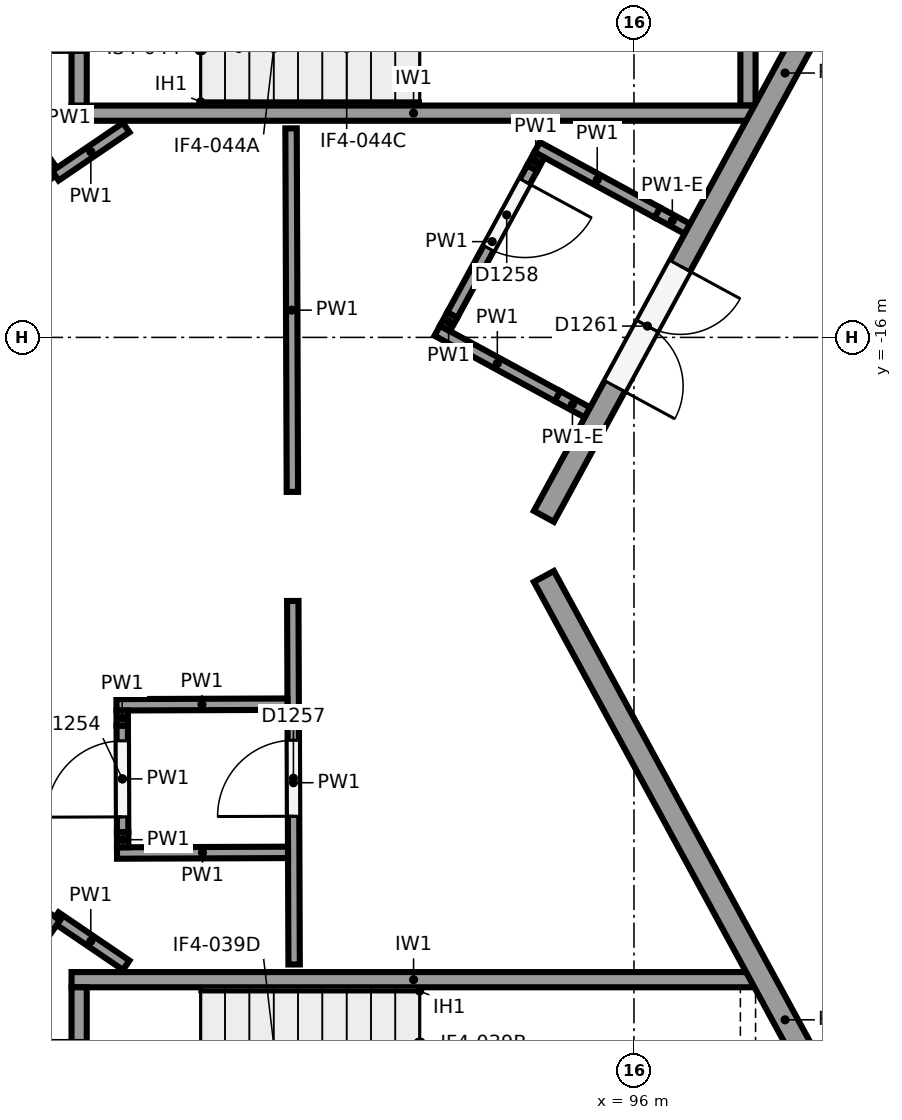
"""IFC4 building model, lengths in metres.
Left out: names, types, materials, properties, quantities, classifications, styles, units other than length and angle.
Written with IfcOpenShell. Run it as: python <this file> out.ifc"""

import sys

from ifc_helpers import new_model, si_unit, direction, frame, frame_2d, origin, origin_2d, place, context, subcontext, project, spatial, rectangle, circle, extrude, element, fill, save


model = new_model("IFC4")
c1 = context("Model", 3, precision=1e-05, world=origin(), true_north=direction((0.0, 1.0)))
c2 = subcontext(c1, "Body", "Model", "MODEL_VIEW")
j1 = project(units=[si_unit("LENGTHUNIT", "METRE"), si_unit("PLANEANGLEUNIT", "RADIAN")], contexts=[c1])
p1 = place(None, origin())
s1 = spatial("IfcSite", under=j1, at=p1, CompositionType="ELEMENT")
p2 = place(p1, origin())
s2 = spatial("IfcBuilding", under=s1, at=p2, CompositionType="ELEMENT")
p3 = place(p2, frame((0.0, 0.0, 12.0)))
s3 = spatial("IfcBuildingStorey", under=s2, at=p3, CompositionType="ELEMENT", Elevation=12.0)
p4 = place(p3, frame((94.6, -18.75, 0.0), z_axis=(0.0, 0.0, 1.0), x_axis=(1.0, 0.0, 0.0)))
e1 = element("IfcColumn", 1, at=p4, inside=s3, PredefinedType="COLUMN", context=c2, shape_type="SweptSolid", body=[
    extrude(circle(Radius=0.45, at=origin_2d()), origin(), (0.0, 0.0, 1.0), 6.0),
])
p5 = place(p3, frame((98.6, -18.75, 0.0), z_axis=(0.0, 0.0, 1.0), x_axis=(1.0, 0.0, 0.0)))
e2 = element("IfcColumn", 2, at=p5, inside=s3, PredefinedType="COLUMN", context=c2, shape_type="SweptSolid", body=[
    extrude(circle(Radius=0.4, at=origin_2d()), origin(), (0.0, 0.0, 1.0), 6.0),
])
p6 = place(p3, frame((94.815, -19.145, 0.0), z_axis=(0.0, 0.0, 1.0), x_axis=(0.477867771117, -0.878431780691, 0.0)))
e3 = element("IfcWall", 3, at=p6, inside=s3, PredefinedType="SOLIDWALL", context=c2, shape_type="SweptSolid", body=[
    extrude(rectangle(XDim=13.28, YDim=0.3, at=frame_2d((6.64, 0.0))), origin(), (0.0, 0.0, 1.0), 4.35),
])
p7 = place(p3, frame((101.161, -6.689, 0.0), z_axis=(0.0, 0.0, 1.0), x_axis=(-0.477867771117, -0.878431780691, 0.0)))
e4 = element("IfcWall", 4, at=p7, inside=s3, PredefinedType="SOLIDWALL", context=c2, shape_type="SweptSolid", body=[
    extrude(rectangle(XDim=13.28, YDim=0.3, at=frame_2d((6.64, 0.0))), origin(), (0.0, 0.0, 1.0), 4.35),
])
p8 = place(p7, frame((9.53, 0.0, 0.0)))
e5 = element("IfcOpeningElement", 5, at=p8, cuts=e4, PredefinedType="OPENING", context=c2, shape_type="SweptSolid", body=[
    extrude(rectangle(XDim=1.8, YDim=2.4, at=frame_2d((0.9, 1.2))), frame((0.0, 0.16, 0.0), z_axis=(0.0, -1.0, 0.0), x_axis=(1.0, 0.0, 0.0)), (0.0, 0.0, 1.0), 0.32),
])
p9 = place(p3, frame((97.6, -24.45, 0.0), z_axis=(0.0, 0.0, 1.0), x_axis=(-1.0, 0.0, 0.0)))
e6 = element("IfcWall", 6, at=p9, inside=s3, PredefinedType="SHEAR", context=c2, shape_type="SweptSolid", body=[
    extrude(rectangle(XDim=9.0, YDim=0.2, at=frame_2d((4.5, 0.0))), origin(), (0.0, 0.0, 1.0), 5.65),
])
p10 = place(p3, frame((97.5, -31.15, 0.0), z_axis=(0.0, 0.0, 1.0), x_axis=(0.0, 1.0, 0.0)))
e7 = element("IfcWall", 7, at=p10, inside=s3, PredefinedType="SHEAR", context=c2, shape_type="SweptSolid", body=[
    extrude(rectangle(XDim=6.6, YDim=0.2, at=frame_2d((3.3, 0.0))), origin(), (0.0, 0.0, 1.0), 5.65),
])
p11 = place(p3, frame((88.7, -27.75, 0.0), z_axis=(0.0, 0.0, 1.0), x_axis=(0.0, 1.0, 0.0)))
e8 = element("IfcWall", 8, at=p11, inside=s3, PredefinedType="SHEAR", context=c2, shape_type="SweptSolid", body=[
    extrude(rectangle(XDim=3.2, YDim=0.2, at=frame_2d((1.6, 0.0))), origin(), (0.0, 0.0, 1.0), 5.65),
])
p12 = place(p11, frame((0.7, 0.0, 0.0)))
e9 = element("IfcOpeningElement", 9, at=p12, cuts=e8, PredefinedType="OPENING", context=c2, shape_type="SweptSolid", body=[
    extrude(rectangle(XDim=1.8, YDim=2.1, at=frame_2d((0.9, 1.05))), frame((0.0, 0.11, 0.0), z_axis=(0.0, -1.0, 0.0), x_axis=(1.0, 0.0, 0.0)), (0.0, 0.0, 1.0), 0.22),
])
p13 = place(p3, frame((97.6, -13.05, 0.0), z_axis=(0.0, 0.0, 1.0), x_axis=(-1.0, 0.0, 0.0)))
e10 = element("IfcWall", 10, at=p13, inside=s3, PredefinedType="SHEAR", context=c2, shape_type="SweptSolid", body=[
    extrude(rectangle(XDim=9.0, YDim=0.2, at=frame_2d((4.5, 0.0))), origin(), (0.0, 0.0, 1.0), 5.65),
])
p14 = place(p3, frame((97.5, -12.95, 0.0), z_axis=(0.0, 0.0, 1.0), x_axis=(0.0, 1.0, 0.0)))
e11 = element("IfcWall", 11, at=p14, inside=s3, PredefinedType="SHEAR", context=c2, shape_type="SweptSolid", body=[
    extrude(rectangle(XDim=6.6, YDim=0.2, at=frame_2d((3.3, 0.0))), origin(), (0.0, 0.0, 1.0), 5.65),
])
p15 = place(p3, frame((88.7, -12.95, 0.0), z_axis=(0.0, 0.0, 1.0), x_axis=(0.0, 1.0, 0.0)))
e12 = element("IfcWall", 12, at=p15, inside=s3, PredefinedType="SHEAR", context=c2, shape_type="SweptSolid", body=[
    extrude(rectangle(XDim=3.2, YDim=0.2, at=frame_2d((1.6, 0.0))), origin(), (0.0, 0.0, 1.0), 5.65),
])
p16 = place(p15, frame((0.7, 0.0, 0.0)))
e13 = element("IfcOpeningElement", 13, at=p16, cuts=e12, PredefinedType="OPENING", context=c2, shape_type="SweptSolid", body=[
    extrude(rectangle(XDim=1.8, YDim=2.1, at=frame_2d((0.9, 1.05))), frame((0.0, 0.11, 0.0), z_axis=(0.0, -1.0, 0.0), x_axis=(1.0, 0.0, 0.0)), (0.0, 0.0, 1.0), 0.22),
])
p17 = place(p3, frame((91.529, -24.25, 0.0), z_axis=(0.0, 0.0, 1.0), x_axis=(-0.00367531974, 0.99999324599, 0.0)))
e14 = element("IfcWall", 14, at=p17, inside=s3, PredefinedType="PARTITIONING", context=c2, shape_type="SweptSolid", body=[
    extrude(rectangle(XDim=4.783, YDim=0.15, at=frame_2d((2.391, 0.0))), origin(), (0.0, 0.0, 1.0), 5.65),
])
p18 = place(p17, frame((1.95, 0.0, 0.0)))
e15 = element("IfcOpeningElement", 15, at=p18, cuts=e14, PredefinedType="OPENING", context=c2, shape_type="SweptSolid", body=[
    extrude(rectangle(XDim=1.0, YDim=2.1, at=frame_2d((0.5, 1.05))), frame((0.0, 0.085, 0.0), z_axis=(0.0, -1.0, 0.0), x_axis=(1.0, 0.0, 0.0)), (0.0, 0.0, 1.0), 0.17),
])
p19 = place(p3, frame((91.506, -18.033, 0.0), z_axis=(0.0, 0.0, 1.0), x_axis=(-0.003624274308, 0.999993432296, 0.0)))
e16 = element("IfcWall", 16, at=p19, inside=s3, PredefinedType="PARTITIONING", context=c2, shape_type="SweptSolid", body=[
    extrude(rectangle(XDim=4.783, YDim=0.15, at=frame_2d((2.391, 0.0))), origin(), (0.0, 0.0, 1.0), 5.65),
])
p20 = place(p3, frame((89.32, -24.26, 0.0), z_axis=(0.0, 0.0, 1.0), x_axis=(-0.827055308354, 0.562120553728, 0.0)))
e17 = element("IfcWall", 17, at=p20, inside=s3, PredefinedType="PARTITIONING", context=c2, shape_type="SweptSolid", body=[
    extrude(rectangle(XDim=1.128, YDim=0.15, at=frame_2d((0.564, 0.0))), origin(), (0.0, 0.0, 1.0), 5.65),
])
p21 = place(p3, frame((88.387, -23.626, 0.0), z_axis=(0.0, 0.0, 1.0), x_axis=(-0.575376756214, -0.817888493872, 0.0)))
e18 = element("IfcWall", 18, at=p21, inside=s3, PredefinedType="PARTITIONING", context=c2, shape_type="SweptSolid", body=[
    extrude(rectangle(XDim=0.83, YDim=0.15, at=frame_2d((0.415, 0.0))), origin(), (0.0, 0.0, 1.0), 5.65),
])
p22 = place(p3, frame((87.909, -13.195, 0.0), z_axis=(0.0, 0.0, 1.0), x_axis=(0.576359888906, -0.817195985342, 0.0)))
e19 = element("IfcWall", 19, at=p22, inside=s3, PredefinedType="PARTITIONING", context=c2, shape_type="SweptSolid", body=[
    extrude(rectangle(XDim=0.83, YDim=0.15, at=frame_2d((0.415, 0.0))), origin(), (0.0, 0.0, 1.0), 5.65),
])
p23 = place(p3, frame((88.388, -13.874, 0.0), z_axis=(0.0, 0.0, 1.0), x_axis=(0.826749248939, 0.562570599462, 0.0)))
e20 = element("IfcWall", 20, at=p23, inside=s3, PredefinedType="PARTITIONING", context=c2, shape_type="SweptSolid", body=[
    extrude(rectangle(XDim=1.127, YDim=0.15, at=frame_2d((0.564, 0.0))), origin(), (0.0, 0.0, 1.0), 5.65),
])
for number, where, z_axis, x_axis in (
    (21, (91.448, -22.775, 0.0), (0.0, 0.0, 1.0), (-1.0, -0.004, 0.0)),
    (22, (91.441, -20.825, 0.0), (0.0, 0.0, 1.0), (-1.0, -0.004, 0.0)),
):
    element("IfcWall", number, at=place(p3, frame(where, z_axis=z_axis, x_axis=x_axis)), inside=s3, PredefinedType="PARTITIONING", context=c2, shape_type="SweptSolid", body=[
        extrude(rectangle(XDim=2.25, YDim=0.15, at=frame_2d((1.125, 0.0))), origin(), (0.0, 0.0, 1.0), 5.65),
    ])
p24 = place(p3, frame((89.273, -22.708, 0.0), z_axis=(0.0, 0.0, 1.0), x_axis=(-0.003662979089, 0.99999329127, 0.0)))
e23 = element("IfcWall", 23, at=p24, inside=s3, PredefinedType="PARTITIONING", context=c2, shape_type="SweptSolid", body=[
    extrude(rectangle(XDim=0.2, YDim=0.15, at=frame_2d((0.1, 0.0))), origin(), (0.0, 0.0, 1.0), 5.65),
])
p25 = place(p3, frame((89.272, -22.508, 0.0), z_axis=(0.0, 0.0, 1.0), x_axis=(-0.00366234028, 0.999993293609, 0.0)))
e24 = element("IfcWall", 24, at=p25, inside=s3, PredefinedType="PARTITIONING", context=c2, shape_type="SweptSolid", body=[
    extrude(rectangle(XDim=1.4, YDim=0.15, at=frame_2d((0.7, 0.0))), origin(), (0.0, 0.0, 1.0), 5.65),
])
p26 = place(p25, frame((0.2, 0.0, 0.0)))
e25 = element("IfcOpeningElement", 25, at=p26, cuts=e24, PredefinedType="OPENING", context=c2, shape_type="SweptSolid", body=[
    extrude(rectangle(XDim=1.0, YDim=2.1, at=frame_2d((0.5, 1.05))), frame((0.0, 0.085, 0.0), z_axis=(0.0, -1.0, 0.0), x_axis=(1.0, 0.0, 0.0)), (0.0, 0.0, 1.0), 0.17),
])
p27 = place(p3, frame((89.267, -21.108, 0.0), z_axis=(0.0, 0.0, 1.0), x_axis=(-0.003658512101, 0.999993307622, 0.0)))
e26 = element("IfcWall", 26, at=p27, inside=s3, PredefinedType="PARTITIONING", context=c2, shape_type="SweptSolid", body=[
    extrude(rectangle(XDim=0.2, YDim=0.15, at=frame_2d((0.1, 0.0))), origin(), (0.0, 0.0, 1.0), 5.65),
])
p28 = place(p3, frame((96.702, -14.572, 0.0), z_axis=(0.0, 0.0, 1.0), x_axis=(-0.878372019733, 0.477977609256, 0.0)))
e27 = element("IfcWall", 27, at=p28, inside=s3, PredefinedType="PARTITIONING", context=c2, shape_type="SweptSolid", body=[
    extrude(rectangle(XDim=0.45, YDim=0.15, at=frame_2d((0.225, 0.0))), origin(), (0.0, 0.0, 1.0), 4.35),
])
p29 = place(p3, frame((96.307, -14.357, 0.0), z_axis=(0.0, 0.0, 1.0), x_axis=(-0.878428962466, 0.477872951632, 0.0)))
e28 = element("IfcWall", 28, at=p29, inside=s3, PredefinedType="PARTITIONING", context=c2, shape_type="SweptSolid", body=[
    extrude(rectangle(XDim=1.8, YDim=0.15, at=frame_2d((0.9, 0.0))), origin(), (0.0, 0.0, 1.0), 5.65),
])
p30 = place(p3, frame((95.388, -16.987, 0.0), z_axis=(0.0, 0.0, 1.0), x_axis=(-0.878372019733, 0.477977609256, 0.0)))
e29 = element("IfcWall", 29, at=p30, inside=s3, PredefinedType="PARTITIONING", context=c2, shape_type="SweptSolid", body=[
    extrude(rectangle(XDim=0.45, YDim=0.15, at=frame_2d((0.225, 0.0))), origin(), (0.0, 0.0, 1.0), 4.35),
])
p31 = place(p3, frame((94.993, -16.772, 0.0), z_axis=(0.0, 0.0, 1.0), x_axis=(-0.878459932885, 0.477816017223, 0.0)))
e30 = element("IfcWall", 30, at=p31, inside=s3, PredefinedType="PARTITIONING", context=c2, shape_type="SweptSolid", body=[
    extrude(rectangle(XDim=1.8, YDim=0.15, at=frame_2d((0.9, 0.0))), origin(), (0.0, 0.0, 1.0), 5.65),
])
p32 = place(p3, frame((94.756, -13.598, 0.0), z_axis=(0.0, 0.0, 1.0), x_axis=(-0.478168266369, -0.878268244352, 0.0)))
e31 = element("IfcWall", 31, at=p32, inside=s3, PredefinedType="PARTITIONING", context=c2, shape_type="SweptSolid", body=[
    extrude(rectangle(XDim=0.2, YDim=0.15, at=frame_2d((0.1, 0.0))), origin(), (0.0, 0.0, 1.0), 5.65),
])
p33 = place(p3, frame((94.66, -13.774, 0.0), z_axis=(0.0, 0.0, 1.0), x_axis=(-0.477887643273, -0.878420969927, 0.0)))
e32 = element("IfcWall", 32, at=p33, inside=s3, PredefinedType="PARTITIONING", context=c2, shape_type="SweptSolid", body=[
    extrude(rectangle(XDim=2.2, YDim=0.15, at=frame_2d((1.1, 0.0))), origin(), (0.0, 0.0, 1.0), 5.65),
])
p34 = place(p33, frame((0.2, 0.0, 0.0)))
e33 = element("IfcOpeningElement", 33, at=p34, cuts=e32, PredefinedType="OPENING", context=c2, shape_type="SweptSolid", body=[
    extrude(rectangle(XDim=1.0, YDim=2.1, at=frame_2d((0.5, 1.05))), frame((0.0, 0.085, 0.0), z_axis=(0.0, -1.0, 0.0), x_axis=(1.0, 0.0, 0.0)), (0.0, 0.0, 1.0), 0.17),
])
p35 = place(p3, frame((93.609, -15.706, 0.0), z_axis=(0.0, 0.0, 1.0), x_axis=(-0.477226530971, -0.878780312785, 0.0)))
e34 = element("IfcWall", 34, at=p35, inside=s3, PredefinedType="PARTITIONING", context=c2, shape_type="SweptSolid", body=[
    extrude(rectangle(XDim=0.2, YDim=0.15, at=frame_2d((0.1, 0.0))), origin(), (0.0, 0.0, 1.0), 5.65),
])
p36 = place(p8, origin())
e35 = element("IfcDoor", 35, at=p36, inside=s3, OperationType="DOUBLE_DOOR_SINGLE_SWING", PredefinedType="DOOR", context=c2, shape_type="SweptSolid", body=[
    extrude(rectangle(XDim=1.8, YDim=2.4, at=frame_2d((0.9, 1.2))), frame((0.0, 0.025, 0.0), z_axis=(0.0, -1.0, 0.0), x_axis=(1.0, 0.0, 0.0)), (0.0, 0.0, 1.0), 0.05),
])
fill(e5, e35)
p37 = place(p16, origin())
e36 = element("IfcDoor", 36, at=p37, inside=s3, OperationType="DOUBLE_DOOR_SINGLE_SWING", PredefinedType="DOOR", context=c2, shape_type="SweptSolid", body=[
    extrude(rectangle(XDim=1.8, YDim=2.1, at=frame_2d((0.9, 1.05))), frame((0.0, 0.025, 0.0), z_axis=(0.0, -1.0, 0.0), x_axis=(1.0, 0.0, 0.0)), (0.0, 0.0, 1.0), 0.05),
])
fill(e13, e36)
p38 = place(p18, origin())
e37 = element("IfcDoor", 37, at=p38, inside=s3, OperationType="SINGLE_SWING_LEFT", PredefinedType="DOOR", context=c2, shape_type="SweptSolid", body=[
    extrude(rectangle(XDim=1.0, YDim=2.1, at=frame_2d((0.5, 1.05))), frame((0.0, 0.025, 0.0), z_axis=(0.0, -1.0, 0.0), x_axis=(1.0, 0.0, 0.0)), (0.0, 0.0, 1.0), 0.05),
])
fill(e15, e37)
p39 = place(p26, origin())
e38 = element("IfcDoor", 38, at=p39, inside=s3, OperationType="SINGLE_SWING_LEFT", PredefinedType="DOOR", context=c2, shape_type="SweptSolid", body=[
    extrude(rectangle(XDim=1.0, YDim=2.1, at=frame_2d((0.5, 1.05))), frame((0.0, 0.025, 0.0), z_axis=(0.0, -1.0, 0.0), x_axis=(1.0, 0.0, 0.0)), (0.0, 0.0, 1.0), 0.05),
])
fill(e25, e38)
p40 = place(p34, origin())
e39 = element("IfcDoor", 39, at=p40, inside=s3, OperationType="SINGLE_SWING_LEFT", PredefinedType="DOOR", context=c2, shape_type="SweptSolid", body=[
    extrude(rectangle(XDim=1.0, YDim=2.1, at=frame_2d((0.5, 1.05))), frame((0.0, 0.025, 0.0), z_axis=(0.0, -1.0, 0.0), x_axis=(1.0, 0.0, 0.0)), (0.0, 0.0, 1.0), 0.05),
])
fill(e33, e39)
save(model, sys.argv[1])
